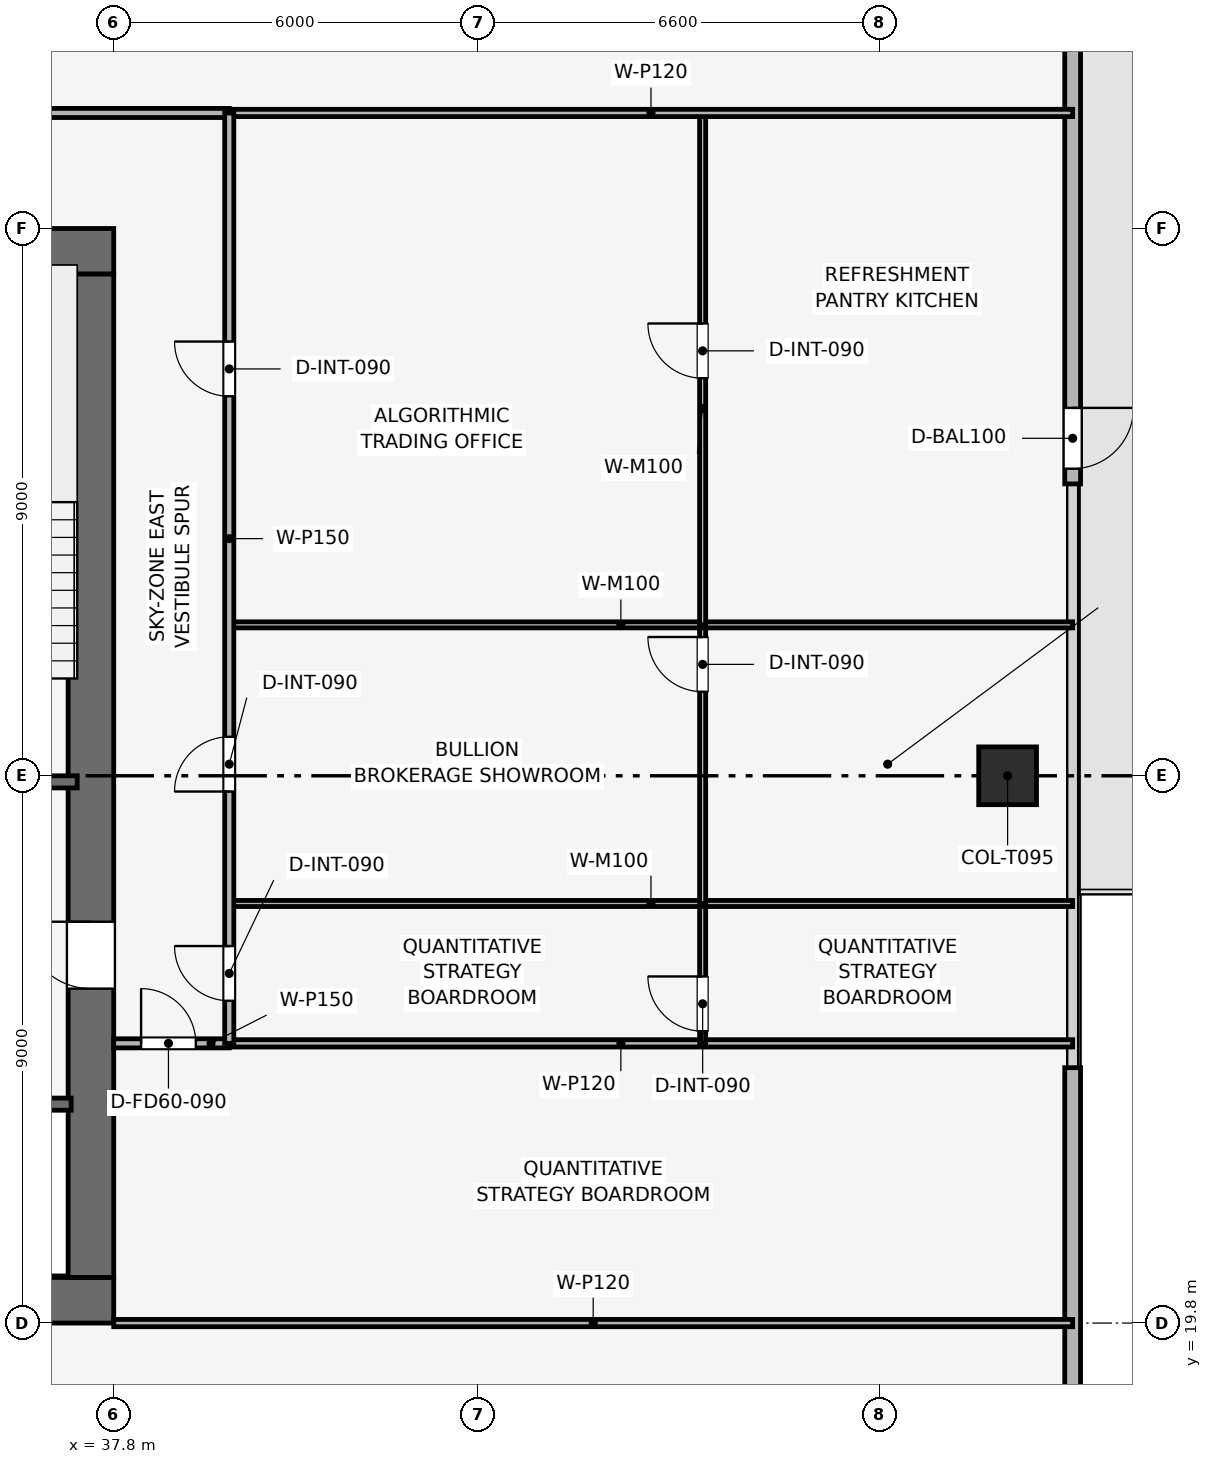
"""IFC4 building model, lengths in metres.
Left out: names, types, materials, properties, quantities, classifications, styles, units other than length and angle.
Written with IfcOpenShell. Run it as: python <this file> out.ifc"""

import sys

from ifc_helpers import new_model, si_unit, direction, frame, frame_2d, origin, origin_2d, place, context, subcontext, project, spatial, rectangle, extrude, element, fill, save


model = new_model("IFC4")
c1 = context("Model", 3, precision=1e-05, world=origin(), true_north=direction((0.0, 1.0)))
c2 = subcontext(c1, "Body", "Model", "MODEL_VIEW")
j1 = project(units=[si_unit("LENGTHUNIT", "METRE"), si_unit("PLANEANGLEUNIT", "RADIAN")], contexts=[c1])
p1 = place(None, origin())
s1 = spatial("IfcSite", under=j1, at=p1, CompositionType="ELEMENT")
p2 = place(p1, origin())
s2 = spatial("IfcBuilding", under=s1, at=p2, CompositionType="ELEMENT")
p3 = place(p2, frame((0.0, 0.0, 250.35)))
s3 = spatial("IfcBuildingStorey", under=s2, at=p3, CompositionType="ELEMENT", Elevation=250.35)
p4 = place(p3, frame((19.8, 20.175, 0.0), z_axis=(0.0, 0.0, 1.0), x_axis=(1.0, 0.0, 0.0)))
e1 = element("IfcWall", 1, at=p4, inside=s3, PredefinedType="SHEAR", context=c2, shape_type="SweptSolid", body=[
    extrude(rectangle(XDim=18.0, YDim=0.75, at=frame_2d((9.0, 0.0))), origin(), (0.0, 0.0, 1.0), 3.75),
])
p5 = place(p3, frame((19.8, 37.425, 0.0), z_axis=(0.0, 0.0, 1.0), x_axis=(1.0, 0.0, 0.0)))
e2 = element("IfcWall", 2, at=p5, inside=s3, PredefinedType="SHEAR", context=c2, shape_type="SweptSolid", body=[
    extrude(rectangle(XDim=18.0, YDim=0.75, at=frame_2d((9.0, 0.0))), origin(), (0.0, 0.0, 1.0), 3.75),
])
p6 = place(p5, frame((7.05, 0.0, 0.0)))
e3 = element("IfcOpeningElement", 3, at=p6, cuts=e2, PredefinedType="OPENING", context=c2, shape_type="SweptSolid", body=[
    extrude(rectangle(XDim=1.1, YDim=2.15, at=frame_2d((0.55, 1.075))), frame((0.0, 0.385, 0.0), z_axis=(0.0, -1.0, 0.0), x_axis=(1.0, 0.0, 0.0)), (0.0, 0.0, 1.0), 0.77),
])
p7 = place(p3, frame((37.425, 20.55, 0.0), z_axis=(0.0, 0.0, 1.0), x_axis=(0.0, 1.0, 0.0)))
e4 = element("IfcWall", 4, at=p7, inside=s3, PredefinedType="SHEAR", context=c2, shape_type="SweptSolid", body=[
    extrude(rectangle(XDim=16.5, YDim=0.75, at=frame_2d((8.25, 0.0))), origin(), (0.0, 0.0, 1.0), 3.75),
])
p8 = place(p7, frame((4.75, 0.0, 0.0)))
e5 = element("IfcOpeningElement", 5, at=p8, cuts=e4, PredefinedType="OPENING", context=c2, shape_type="SweptSolid", body=[
    extrude(rectangle(XDim=1.1, YDim=2.15, at=frame_2d((0.55, 1.075))), frame((0.0, 0.385, 0.0), z_axis=(0.0, -1.0, 0.0), x_axis=(1.0, 0.0, 0.0)), (0.0, 0.0, 1.0), 0.77),
])
p9 = place(p3, frame((52.5, 28.8, 0.003), z_axis=(0.0, 0.0, 1.0), x_axis=(1.0, 0.0, 0.0)))
e6 = element("IfcColumn", 6, at=p9, inside=s3, PredefinedType="COLUMN", context=c2, shape_type="SweptSolid", body=[
    extrude(rectangle(XDim=0.95, YDim=0.95, at=origin_2d()), origin(), (0.0, 0.0, 1.0), 3.494),
])
p10 = place(p3, frame((53.57, 46.8, 0.0), z_axis=(0.0, 0.0, 1.0), x_axis=(0.0, -1.0, 0.0)))
e7 = element("IfcWall", 7, at=p10, inside=s3, PredefinedType="SOLIDWALL", context=c2, shape_type="SweptSolid", body=[
    extrude(rectangle(XDim=13.2, YDim=0.26, at=frame_2d((6.6, 0.0))), origin(), (0.0, 0.0, 1.0), 3.5),
])
p11 = place(p10, frame((11.95, 0.0, 0.0)))
e8 = element("IfcOpeningElement", 8, at=p11, cuts=e7, PredefinedType="OPENING", context=c2, shape_type="SweptSolid", body=[
    extrude(rectangle(XDim=1.0, YDim=2.2, at=frame_2d((0.5, 1.1))), frame((0.0, 0.14, 0.0), z_axis=(0.0, -1.0, 0.0), x_axis=(1.0, 0.0, 0.0)), (0.0, 0.0, 1.0), 0.28),
])
p12 = place(p3, frame((53.57, 24.0, 0.0), z_axis=(0.0, 0.0, 1.0), x_axis=(0.0, -1.0, 0.0)))
e9 = element("IfcWall", 9, at=p12, inside=s3, PredefinedType="SOLIDWALL", context=c2, shape_type="SweptSolid", body=[
    extrude(rectangle(XDim=13.2, YDim=0.26, at=frame_2d((6.6, 0.0))), origin(), (0.0, 0.0, 1.0), 3.5),
])
p13 = place(p12, frame((11.75, 0.0, 0.9)))
e10 = element("IfcOpeningElement", 10, at=p13, cuts=e9, PredefinedType="OPENING", context=c2, shape_type="SweptSolid", body=[
    extrude(rectangle(XDim=1.2, YDim=2.1, at=frame_2d((0.6, 1.05))), frame((0.0, 0.14, 0.0), z_axis=(0.0, -1.0, 0.0), x_axis=(1.0, 0.0, 0.0)), (0.0, 0.0, 1.0), 0.28),
])
p14 = place(p3, frame((34.05, 28.7, 0.0), z_axis=(0.0, 0.0, 1.0), x_axis=(1.0, 0.0, 0.0)))
e11 = element("IfcWall", 11, at=p14, inside=s3, PredefinedType="SHEAR", context=c2, shape_type="SweptSolid", body=[
    extrude(rectangle(XDim=3.15, YDim=0.2, at=frame_2d((1.575, 0.0))), origin(), (0.0, 0.0, 1.0), 3.5),
])
p15 = place(p14, frame((0.8, 0.0, 0.0)))
e12 = element("IfcOpeningElement", 12, at=p15, cuts=e11, PredefinedType="OPENING", context=c2, shape_type="SweptSolid", body=[
    extrude(rectangle(XDim=1.0, YDim=2.1, at=frame_2d((0.5, 1.05))), frame((0.0, 0.11, 0.0), z_axis=(0.0, -1.0, 0.0), x_axis=(1.0, 0.0, 0.0)), (0.0, 0.0, 1.0), 0.22),
])
p16 = place(p3, frame((34.05, 23.4, 0.0), z_axis=(0.0, 0.0, 1.0), x_axis=(1.0, 0.0, 0.0)))
e13 = element("IfcWall", 13, at=p16, inside=s3, PredefinedType="SHEAR", context=c2, shape_type="SweptSolid", body=[
    extrude(rectangle(XDim=3.05, YDim=0.2, at=frame_2d((1.525, 0.0))), origin(), (0.0, 0.0, 1.0), 3.5),
])
p17 = place(p16, frame((1.2, 0.0, 0.0)))
e14 = element("IfcOpeningElement", 14, at=p17, cuts=e13, PredefinedType="OPENING", context=c2, shape_type="SweptSolid", body=[
    extrude(rectangle(XDim=1.1, YDim=2.15, at=frame_2d((0.55, 1.075))), frame((0.0, 0.11, 0.0), z_axis=(0.0, -1.0, 0.0), x_axis=(1.0, 0.0, 0.0)), (0.0, 0.0, 1.0), 0.22),
])
p18 = place(p3, frame((37.8, 19.8, 0.0), z_axis=(0.0, 0.0, 1.0), x_axis=(1.0, 0.0, 0.0)))
e15 = element("IfcWall", 15, at=p18, inside=s3, PredefinedType="PARTITIONING", context=c2, shape_type="SweptSolid", body=[
    extrude(rectangle(XDim=15.77, YDim=0.12, at=frame_2d((7.885, 0.0))), origin(), (0.0, 0.0, 1.0), 3.085),
])
p19 = place(p3, frame((37.8, 24.4, 0.0), z_axis=(0.0, 0.0, 1.0), x_axis=(1.0, 0.0, 0.0)))
e16 = element("IfcWall", 16, at=p19, inside=s3, PredefinedType="PARTITIONING", context=c2, shape_type="SweptSolid", body=[
    extrude(rectangle(XDim=1.9, YDim=0.15, at=frame_2d((0.95, 0.0))), origin(), (0.0, 0.0, 1.0), 3.5),
])
p20 = place(p19, frame((0.45, 0.0, 0.0)))
e17 = element("IfcOpeningElement", 17, at=p20, cuts=e16, PredefinedType="OPENING", context=c2, shape_type="SweptSolid", body=[
    extrude(rectangle(XDim=0.9, YDim=2.1, at=frame_2d((0.45, 1.05))), frame((0.0, 0.085, 0.0), z_axis=(0.0, -1.0, 0.0), x_axis=(1.0, 0.0, 0.0)), (0.0, 0.0, 1.0), 0.17),
])
p21 = place(p3, frame((39.7, 24.4, 0.0), z_axis=(0.0, 0.0, 1.0), x_axis=(1.0, 0.0, 0.0)))
e18 = element("IfcWall", 18, at=p21, inside=s3, PredefinedType="PARTITIONING", context=c2, shape_type="SweptSolid", body=[
    extrude(rectangle(XDim=13.87, YDim=0.12, at=frame_2d((6.935, 0.0))), origin(), (0.0, 0.0, 1.0), 3.085),
])
p22 = place(p3, frame((47.485, 24.4, 0.0), z_axis=(0.0, 0.0, 1.0), x_axis=(0.0, 1.0, 0.0)))
e19 = element("IfcWall", 19, at=p22, inside=s3, PredefinedType="MOVABLE", context=c2, shape_type="SweptSolid", body=[
    extrude(rectangle(XDim=2.3, YDim=0.1, at=frame_2d((1.15, 0.0))), origin(), (0.0, 0.0, 1.0), 3.5),
])
p23 = place(p22, frame((0.2, 0.0, 0.0)))
e20 = element("IfcOpeningElement", 20, at=p23, cuts=e19, PredefinedType="OPENING", context=c2, shape_type="SweptSolid", body=[
    extrude(rectangle(XDim=0.9, YDim=2.1, at=frame_2d((0.45, 1.05))), frame((0.0, 0.06, 0.0), z_axis=(0.0, -1.0, 0.0), x_axis=(1.0, 0.0, 0.0)), (0.0, 0.0, 1.0), 0.12),
])
p24 = place(p3, frame((39.7, 26.7, 0.0), z_axis=(0.0, 0.0, 1.0), x_axis=(1.0, 0.0, 0.0)))
e21 = element("IfcWall", 21, at=p24, inside=s3, PredefinedType="MOVABLE", context=c2, shape_type="SweptSolid", body=[
    extrude(rectangle(XDim=13.87, YDim=0.1, at=frame_2d((6.935, 0.0))), origin(), (0.0, 0.0, 1.0), 3.085),
])
p25 = place(p3, frame((47.485, 26.7, 0.0), z_axis=(0.0, 0.0, 1.0), x_axis=(0.0, 1.0, 0.0)))
e22 = element("IfcWall", 22, at=p25, inside=s3, PredefinedType="MOVABLE", context=c2, shape_type="SweptSolid", body=[
    extrude(rectangle(XDim=4.582, YDim=0.1, at=frame_2d((2.291, 0.0))), origin(), (0.0, 0.0, 1.0), 3.085),
])
p26 = place(p25, frame((3.482, 0.0, 0.0)))
e23 = element("IfcOpeningElement", 23, at=p26, cuts=e22, PredefinedType="OPENING", context=c2, shape_type="SweptSolid", body=[
    extrude(rectangle(XDim=0.9, YDim=2.1, at=frame_2d((0.45, 1.05))), frame((0.0, 0.06, 0.0), z_axis=(0.0, -1.0, 0.0), x_axis=(1.0, 0.0, 0.0)), (0.0, 0.0, 1.0), 0.12),
])
p27 = place(p3, frame((39.7, 31.282, 0.0), z_axis=(0.0, 0.0, 1.0), x_axis=(1.0, 0.0, 0.0)))
e24 = element("IfcWall", 24, at=p27, inside=s3, PredefinedType="MOVABLE", context=c2, shape_type="SweptSolid", body=[
    extrude(rectangle(XDim=13.87, YDim=0.1, at=frame_2d((6.935, 0.0))), origin(), (0.0, 0.0, 1.0), 3.085),
])
p28 = place(p3, frame((47.485, 31.282, 0.0), z_axis=(0.0, 0.0, 1.0), x_axis=(0.0, 1.0, 0.0)))
e25 = element("IfcWall", 25, at=p28, inside=s3, PredefinedType="MOVABLE", context=c2, shape_type="SweptSolid", body=[
    extrude(rectangle(XDim=8.418, YDim=0.1, at=frame_2d((4.209, 0.0))), origin(), (0.0, 0.0, 1.0), 3.085),
])
p29 = place(p28, frame((4.056, 0.0, 0.0)))
e26 = element("IfcOpeningElement", 26, at=p29, cuts=e25, PredefinedType="OPENING", context=c2, shape_type="SweptSolid", body=[
    extrude(rectangle(XDim=0.9, YDim=2.1, at=frame_2d((0.45, 1.05))), frame((0.0, 0.06, 0.0), z_axis=(0.0, -1.0, 0.0), x_axis=(1.0, 0.0, 0.0)), (0.0, 0.0, 1.0), 0.12),
])
p30 = place(p3, frame((39.7, 39.7, 0.0), z_axis=(0.0, 0.0, 1.0), x_axis=(1.0, 0.0, 0.0)))
e27 = element("IfcWall", 27, at=p30, inside=s3, PredefinedType="PARTITIONING", context=c2, shape_type="SweptSolid", body=[
    extrude(rectangle(XDim=13.87, YDim=0.12, at=frame_2d((6.935, 0.0))), origin(), (0.0, 0.0, 1.0), 3.085),
])
p31 = place(p3, frame((17.9, 39.7, 0.0), z_axis=(0.0, 0.0, 1.0), x_axis=(1.0, 0.0, 0.0)))
e28 = element("IfcWall", 28, at=p31, inside=s3, PredefinedType="PARTITIONING", context=c2, shape_type="SweptSolid", body=[
    extrude(rectangle(XDim=21.8, YDim=0.15, at=frame_2d((10.9, 0.0))), origin(), (0.0, 0.0, 1.0), 3.085),
])
p32 = place(p31, frame((0.9, 0.0, 0.0)))
e29 = element("IfcOpeningElement", 29, at=p32, cuts=e28, PredefinedType="OPENING", context=c2, shape_type="SweptSolid", body=[
    extrude(rectangle(XDim=0.9, YDim=2.1, at=frame_2d((0.45, 1.05))), frame((0.0, 0.085, 0.0), z_axis=(0.0, -1.0, 0.0), x_axis=(1.0, 0.0, 0.0)), (0.0, 0.0, 1.0), 0.17),
])
p33 = place(p31, frame((3.65, 0.0, 0.0)))
e30 = element("IfcOpeningElement", 30, at=p33, cuts=e28, PredefinedType="OPENING", context=c2, shape_type="SweptSolid", body=[
    extrude(rectangle(XDim=0.9, YDim=2.1, at=frame_2d((0.45, 1.05))), frame((0.0, 0.085, 0.0), z_axis=(0.0, -1.0, 0.0), x_axis=(1.0, 0.0, 0.0)), (0.0, 0.0, 1.0), 0.17),
])
p34 = place(p31, frame((6.55, 0.0, 0.0)))
e31 = element("IfcOpeningElement", 31, at=p34, cuts=e28, PredefinedType="OPENING", context=c2, shape_type="SweptSolid", body=[
    extrude(rectangle(XDim=0.9, YDim=2.1, at=frame_2d((0.45, 1.05))), frame((0.0, 0.085, 0.0), z_axis=(0.0, -1.0, 0.0), x_axis=(1.0, 0.0, 0.0)), (0.0, 0.0, 1.0), 0.17),
])
p35 = place(p31, frame((9.3, 0.0, 0.0)))
e32 = element("IfcOpeningElement", 32, at=p35, cuts=e28, PredefinedType="OPENING", context=c2, shape_type="SweptSolid", body=[
    extrude(rectangle(XDim=0.95, YDim=2.1, at=frame_2d((0.475, 1.05))), frame((0.0, 0.085, 0.0), z_axis=(0.0, -1.0, 0.0), x_axis=(1.0, 0.0, 0.0)), (0.0, 0.0, 1.0), 0.17),
])
p36 = place(p31, frame((16.0, 0.0, 0.0)))
e33 = element("IfcOpeningElement", 33, at=p36, cuts=e28, PredefinedType="OPENING", context=c2, shape_type="SweptSolid", body=[
    extrude(rectangle(XDim=0.9, YDim=2.1, at=frame_2d((0.45, 1.05))), frame((0.0, 0.085, 0.0), z_axis=(0.0, -1.0, 0.0), x_axis=(1.0, 0.0, 0.0)), (0.0, 0.0, 1.0), 0.17),
])
p37 = place(p3, frame((39.7, 24.4, 0.0), z_axis=(0.0, 0.0, 1.0), x_axis=(0.0, 1.0, 0.0)))
e34 = element("IfcWall", 34, at=p37, inside=s3, PredefinedType="PARTITIONING", context=c2, shape_type="SweptSolid", body=[
    extrude(rectangle(XDim=15.3, YDim=0.15, at=frame_2d((7.65, 0.0))), origin(), (0.0, 0.0, 1.0), 3.085),
])
p38 = place(p37, frame((0.7, 0.0, 0.0)))
e35 = element("IfcOpeningElement", 35, at=p38, cuts=e34, PredefinedType="OPENING", context=c2, shape_type="SweptSolid", body=[
    extrude(rectangle(XDim=0.9, YDim=2.1, at=frame_2d((0.45, 1.05))), frame((0.0, 0.085, 0.0), z_axis=(0.0, -1.0, 0.0), x_axis=(1.0, 0.0, 0.0)), (0.0, 0.0, 1.0), 0.17),
])
p39 = place(p37, frame((4.141, 0.0, 0.0)))
e36 = element("IfcOpeningElement", 36, at=p39, cuts=e34, PredefinedType="OPENING", context=c2, shape_type="SweptSolid", body=[
    extrude(rectangle(XDim=0.9, YDim=2.1, at=frame_2d((0.45, 1.05))), frame((0.0, 0.085, 0.0), z_axis=(0.0, -1.0, 0.0), x_axis=(1.0, 0.0, 0.0)), (0.0, 0.0, 1.0), 0.17),
])
p40 = place(p37, frame((10.641, 0.0, 0.0)))
e37 = element("IfcOpeningElement", 37, at=p40, cuts=e34, PredefinedType="OPENING", context=c2, shape_type="SweptSolid", body=[
    extrude(rectangle(XDim=0.9, YDim=2.1, at=frame_2d((0.45, 1.05))), frame((0.0, 0.085, 0.0), z_axis=(0.0, -1.0, 0.0), x_axis=(1.0, 0.0, 0.0)), (0.0, 0.0, 1.0), 0.17),
])
p41 = place(p11, origin())
e38 = element("IfcDoor", 38, at=p41, inside=s3, OperationType="SINGLE_SWING_LEFT", PredefinedType="DOOR", context=c2, shape_type="SweptSolid", body=[
    extrude(rectangle(XDim=1.0, YDim=2.2, at=frame_2d((0.5, 1.1))), frame((0.0, 0.025, 0.0), z_axis=(0.0, -1.0, 0.0), x_axis=(1.0, 0.0, 0.0)), (0.0, 0.0, 1.0), 0.05),
])
fill(e8, e38)
p42 = place(p20, origin())
e39 = element("IfcDoor", 39, at=p42, inside=s3, OperationType="SINGLE_SWING_LEFT", PredefinedType="DOOR", context=c2, shape_type="SweptSolid", body=[
    extrude(rectangle(XDim=0.9, YDim=2.1, at=frame_2d((0.45, 1.05))), frame((0.0, 0.025, 0.0), z_axis=(0.0, -1.0, 0.0), x_axis=(1.0, 0.0, 0.0)), (0.0, 0.0, 1.0), 0.05),
])
fill(e17, e39)
p43 = place(p23, origin())
e40 = element("IfcDoor", 40, at=p43, inside=s3, OperationType="SINGLE_SWING_RIGHT", PredefinedType="DOOR", context=c2, shape_type="SweptSolid", body=[
    extrude(rectangle(XDim=0.9, YDim=2.1, at=frame_2d((0.45, 1.05))), frame((0.0, 0.025, 0.0), z_axis=(0.0, -1.0, 0.0), x_axis=(1.0, 0.0, 0.0)), (0.0, 0.0, 1.0), 0.05),
])
fill(e20, e40)
p44 = place(p26, origin())
e41 = element("IfcDoor", 41, at=p44, inside=s3, OperationType="SINGLE_SWING_RIGHT", PredefinedType="DOOR", context=c2, shape_type="SweptSolid", body=[
    extrude(rectangle(XDim=0.9, YDim=2.1, at=frame_2d((0.45, 1.05))), frame((0.0, 0.025, 0.0), z_axis=(0.0, -1.0, 0.0), x_axis=(1.0, 0.0, 0.0)), (0.0, 0.0, 1.0), 0.05),
])
fill(e23, e41)
p45 = place(p29, origin())
e42 = element("IfcDoor", 42, at=p45, inside=s3, OperationType="SINGLE_SWING_RIGHT", PredefinedType="DOOR", context=c2, shape_type="SweptSolid", body=[
    extrude(rectangle(XDim=0.9, YDim=2.1, at=frame_2d((0.45, 1.05))), frame((0.0, 0.025, 0.0), z_axis=(0.0, -1.0, 0.0), x_axis=(1.0, 0.0, 0.0)), (0.0, 0.0, 1.0), 0.05),
])
fill(e26, e42)
p46 = place(p38, origin())
e43 = element("IfcDoor", 43, at=p46, inside=s3, OperationType="SINGLE_SWING_RIGHT", PredefinedType="DOOR", context=c2, shape_type="SweptSolid", body=[
    extrude(rectangle(XDim=0.9, YDim=2.1, at=frame_2d((0.45, 1.05))), frame((0.0, 0.025, 0.0), z_axis=(0.0, -1.0, 0.0), x_axis=(1.0, 0.0, 0.0)), (0.0, 0.0, 1.0), 0.05),
])
fill(e35, e43)
p47 = place(p39, origin())
e44 = element("IfcDoor", 44, at=p47, inside=s3, OperationType="SINGLE_SWING_LEFT", PredefinedType="DOOR", context=c2, shape_type="SweptSolid", body=[
    extrude(rectangle(XDim=0.9, YDim=2.1, at=frame_2d((0.45, 1.05))), frame((0.0, 0.025, 0.0), z_axis=(0.0, -1.0, 0.0), x_axis=(1.0, 0.0, 0.0)), (0.0, 0.0, 1.0), 0.05),
])
fill(e36, e44)
p48 = place(p40, origin())
e45 = element("IfcDoor", 45, at=p48, inside=s3, OperationType="SINGLE_SWING_RIGHT", PredefinedType="DOOR", context=c2, shape_type="SweptSolid", body=[
    extrude(rectangle(XDim=0.9, YDim=2.1, at=frame_2d((0.45, 1.05))), frame((0.0, 0.025, 0.0), z_axis=(0.0, -1.0, 0.0), x_axis=(1.0, 0.0, 0.0)), (0.0, 0.0, 1.0), 0.05),
])
fill(e37, e45)
p49 = place(p8, origin())
e46 = element("IfcDoor", 46, at=p49, inside=s3, OperationType="SINGLE_SWING_RIGHT", PredefinedType="DOOR", context=c2, shape_type="SweptSolid", body=[
    extrude(rectangle(XDim=1.1, YDim=2.15, at=frame_2d((0.55, 1.075))), frame((0.0, 0.025, 0.0), z_axis=(0.0, -1.0, 0.0), x_axis=(1.0, 0.0, 0.0)), (0.0, 0.0, 1.0), 0.05),
])
fill(e5, e46)
save(model, sys.argv[1])
